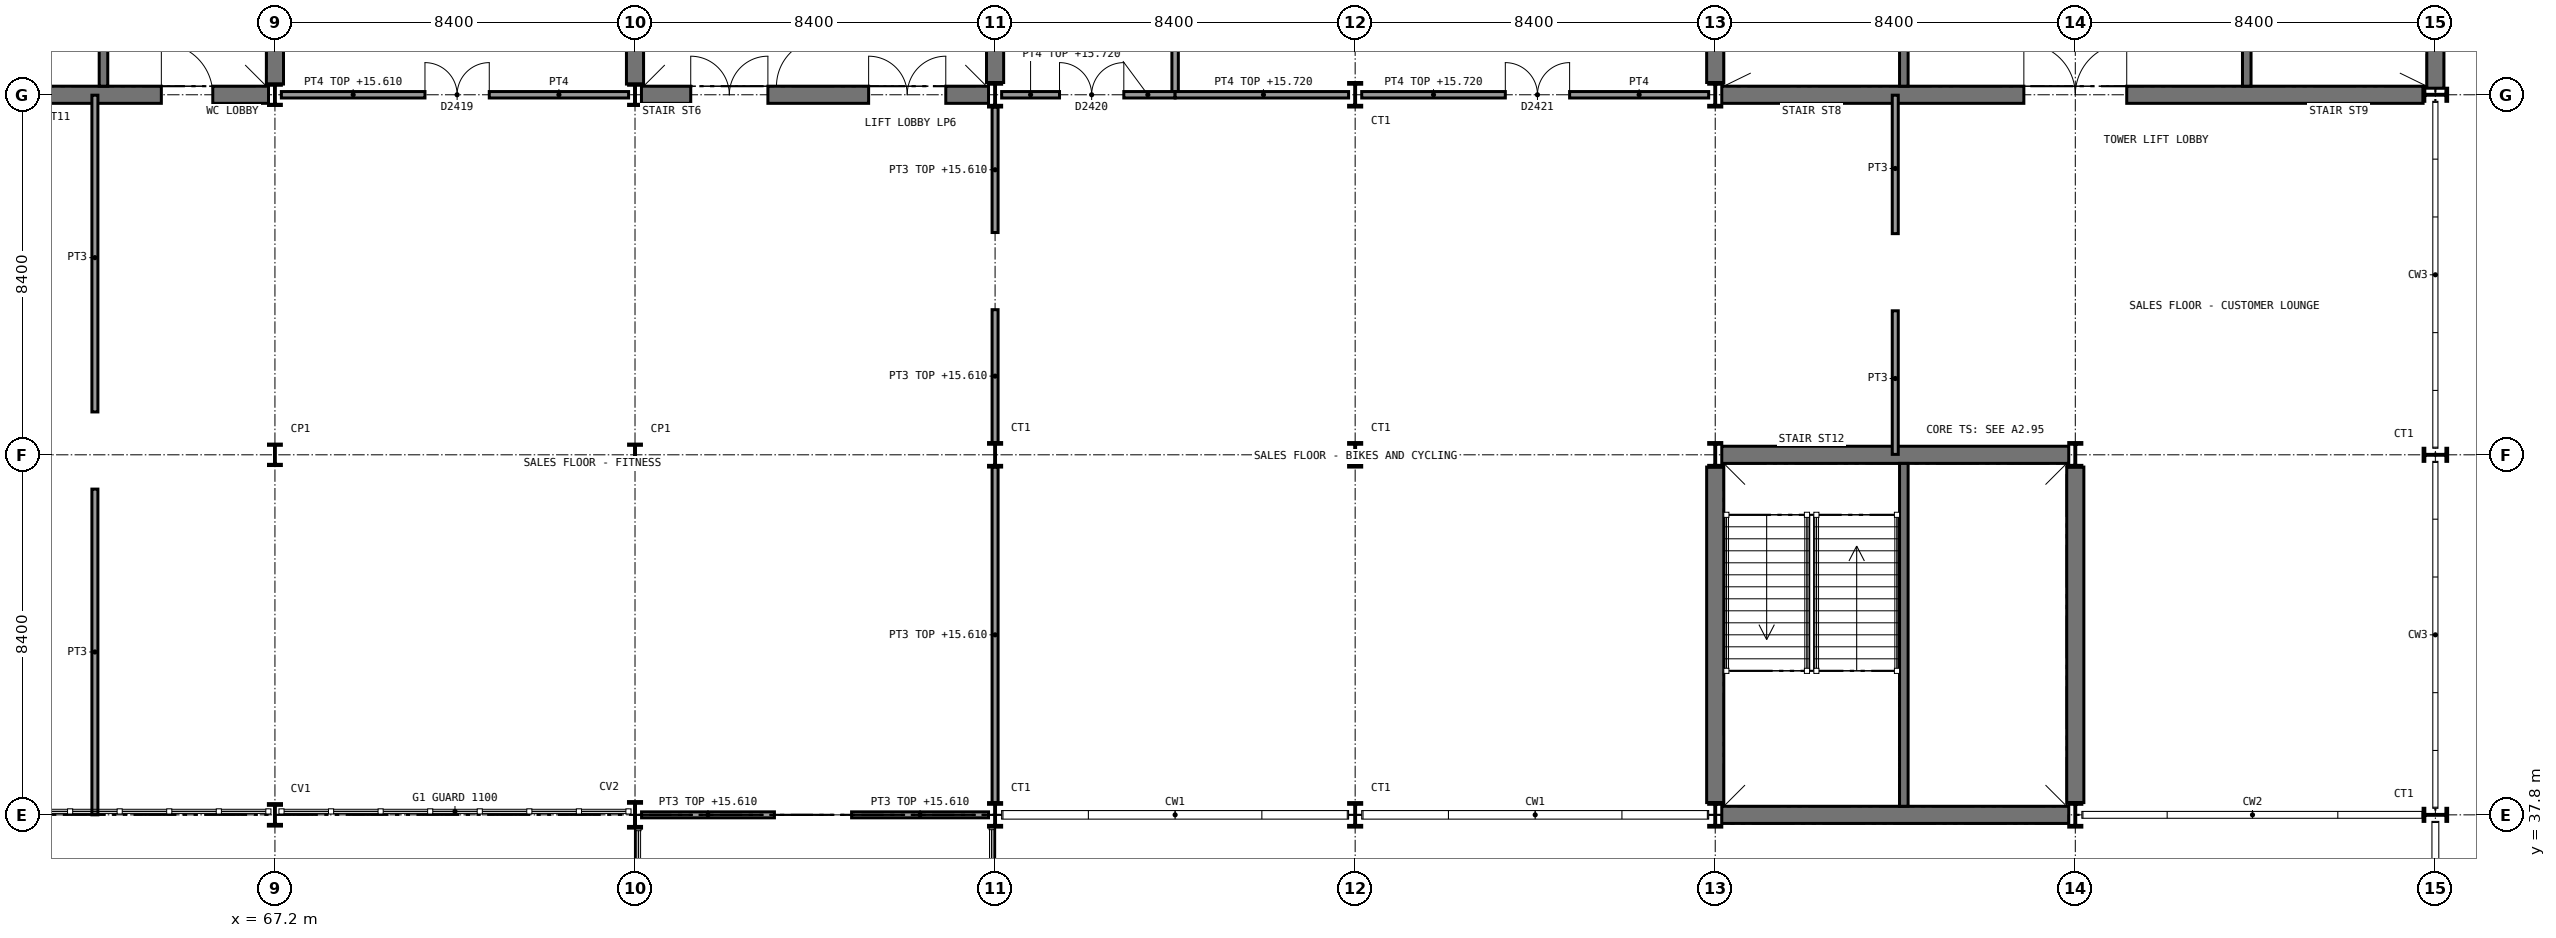
"""IFC4 building model, lengths in metres.
Left out: names, types, materials, properties, quantities, classifications, styles, units other than length and angle.
Written with IfcOpenShell. Run it as: python <this file> out.ifc"""

import sys

from ifc_helpers import new_model, si_unit, direction, frame, frame_2d, origin, origin_2d, place, context, subcontext, project, spatial, rectangle, i_section, extrude, element, fill, save


model = new_model("IFC4")
c1 = context("Model", 3, precision=1e-05, world=origin(), true_north=direction((0.0, 1.0)))
c2 = subcontext(c1, "Body", "Model", "MODEL_VIEW")
j1 = project(units=[si_unit("LENGTHUNIT", "METRE"), si_unit("PLANEANGLEUNIT", "RADIAN")], contexts=[c1])
p1 = place(None, origin())
s1 = spatial("IfcSite", under=j1, at=p1, CompositionType="ELEMENT")
p2 = place(p1, origin())
s2 = spatial("IfcBuilding", under=s1, at=p2, CompositionType="ELEMENT")
p3 = place(p2, frame((0.0, 0.0, 11.4)))
s3 = spatial("IfcBuildingStorey", under=s2, at=p3, CompositionType="ELEMENT", Elevation=11.4)
p4 = place(p3, frame((75.75, 54.6, 0.0), z_axis=(0.0, 0.0, 1.0), x_axis=(1.0, 0.0, 0.0)))
e1 = element("IfcWall", 1, at=p4, inside=s3, PredefinedType="SHEAR", context=c2, shape_type="SweptSolid", body=[
    extrude(rectangle(XDim=8.097, YDim=0.4, at=frame_2d((4.048, 0.0))), origin(), (0.0, 0.0, 1.0), 4.65),
])
p5 = place(p4, frame((1.15, 0.0, 0.0)))
e2 = element("IfcOpeningElement", 2, at=p5, cuts=e1, PredefinedType="OPENING", context=c2, shape_type="SweptSolid", body=[
    extrude(rectangle(XDim=1.8, YDim=2.1, at=frame_2d((0.9, 1.05))), frame((0.0, 0.21, 0.0), z_axis=(0.0, -1.0, 0.0), x_axis=(1.0, 0.0, 0.0)), (0.0, 0.0, 1.0), 0.42),
])
p6 = place(p4, frame((5.3, 0.0, 0.0)))
e3 = element("IfcOpeningElement", 3, at=p6, cuts=e1, PredefinedType="OPENING", context=c2, shape_type="SweptSolid", body=[
    extrude(rectangle(XDim=1.8, YDim=2.1, at=frame_2d((0.9, 1.05))), frame((0.0, 0.21, 0.0), z_axis=(0.0, -1.0, 0.0), x_axis=(1.0, 0.0, 0.0)), (0.0, 0.0, 1.0), 0.42),
])
p7 = place(p3, frame((75.6, 54.85, 0.0), z_axis=(0.0, 0.0, 1.0), x_axis=(0.0, 1.0, 0.0)))
e4 = element("IfcWall", 4, at=p7, inside=s3, PredefinedType="SHEAR", context=c2, shape_type="SweptSolid", body=[
    extrude(rectangle(XDim=7.9, YDim=0.4, at=frame_2d((3.95, 0.0))), origin(), (0.0, 0.0, 1.0), 4.65),
])
p8 = place(p3, frame((84.0, 54.886, 0.0), z_axis=(0.0, 0.0, 1.0), x_axis=(0.0, 1.0, 0.0)))
e5 = element("IfcWall", 5, at=p8, inside=s3, PredefinedType="SHEAR", context=c2, shape_type="SweptSolid", body=[
    extrude(rectangle(XDim=7.828, YDim=0.4, at=frame_2d((3.914, 0.0))), origin(), (0.0, 0.0, 1.0), 4.65),
])
p9 = place(p3, frame((58.95, 54.6, 0.0), z_axis=(0.0, 0.0, 1.0), x_axis=(1.0, 0.0, 0.0)))
e6 = element("IfcWall", 6, at=p9, inside=s3, PredefinedType="SHEAR", context=c2, shape_type="SweptSolid", body=[
    extrude(rectangle(XDim=8.1, YDim=0.4, at=frame_2d((4.05, 0.0))), origin(), (0.0, 0.0, 1.0), 4.65),
])
p10 = place(p9, frame((1.15, 0.0, 0.0)))
e7 = element("IfcOpeningElement", 7, at=p10, cuts=e6, PredefinedType="OPENING", context=c2, shape_type="SweptSolid", body=[
    extrude(rectangle(XDim=1.8, YDim=2.1, at=frame_2d((0.9, 1.05))), frame((0.0, 0.21, 0.0), z_axis=(0.0, -1.0, 0.0), x_axis=(1.0, 0.0, 0.0)), (0.0, 0.0, 1.0), 0.42),
])
p11 = place(p9, frame((5.6, 0.0, 0.0)))
e8 = element("IfcOpeningElement", 8, at=p11, cuts=e6, PredefinedType="OPENING", context=c2, shape_type="SweptSolid", body=[
    extrude(rectangle(XDim=1.2, YDim=2.1, at=frame_2d((0.6, 1.05))), frame((0.0, 0.21, 0.0), z_axis=(0.0, -1.0, 0.0), x_axis=(1.0, 0.0, 0.0)), (0.0, 0.0, 1.0), 0.42),
])
p12 = place(p3, frame((67.2, 54.85, 0.0), z_axis=(0.0, 0.0, 1.0), x_axis=(0.0, 1.0, 0.0)))
e9 = element("IfcWall", 9, at=p12, inside=s3, PredefinedType="SHEAR", context=c2, shape_type="SweptSolid", body=[
    extrude(rectangle(XDim=7.9, YDim=0.4, at=frame_2d((3.95, 0.0))), origin(), (0.0, 0.0, 1.0), 4.65),
])
p13 = place(p3, frame((100.953, 54.6, 0.0), z_axis=(0.0, 0.0, 1.0), x_axis=(1.0, 0.0, 0.0)))
e10 = element("IfcWall", 10, at=p13, inside=s3, PredefinedType="SHEAR", context=c2, shape_type="SweptSolid", body=[
    extrude(rectangle(XDim=16.361, YDim=0.4, at=frame_2d((8.181, 0.0))), origin(), (0.0, 0.0, 1.0), 4.65),
])
p14 = place(p13, frame((7.047, 0.0, 0.0)))
e11 = element("IfcOpeningElement", 11, at=p14, cuts=e10, PredefinedType="OPENING", context=c2, shape_type="SweptSolid", body=[
    extrude(rectangle(XDim=2.4, YDim=2.4, at=frame_2d((1.2, 1.2))), frame((0.0, 0.21, 0.0), z_axis=(0.0, -1.0, 0.0), x_axis=(1.0, 0.0, 0.0)), (0.0, 0.0, 1.0), 0.42),
])
p15 = place(p3, frame((100.8, 54.886, 0.0), z_axis=(0.0, 0.0, 1.0), x_axis=(0.0, 1.0, 0.0)))
e12 = element("IfcWall", 12, at=p15, inside=s3, PredefinedType="SHEAR", context=c2, shape_type="SweptSolid", body=[
    extrude(rectangle(XDim=7.828, YDim=0.4, at=frame_2d((3.914, 0.0))), origin(), (0.0, 0.0, 1.0), 4.65),
])
for number, where, z_axis, x_axis in (
    (13, (117.6, 54.753, 0.0), (0.0, 0.0, 1.0), (0.0, 1.0, 0.0)),
    (14, (100.953, 37.8, 0.0), (0.0, 0.0, 1.0), (1.0, 0.0, 0.0)),
    (15, (100.953, 46.2, 0.0), (0.0, 0.0, 1.0), (1.0, 0.0, 0.0)),
):
    element("IfcWall", number, at=place(p3, frame(where, z_axis=z_axis, x_axis=x_axis)), inside=s3, PredefinedType="SHEAR", context=c2, shape_type="SweptSolid", body=[
        extrude(rectangle(XDim=8.094, YDim=0.4, at=frame_2d((4.047, 0.0))), origin(), (0.0, 0.0, 1.0), 4.65),
    ])
for number, where, z_axis, x_axis in (
    (16, (100.8, 38.086, 0.0), (0.0, 0.0, 1.0), (0.0, 1.0, 0.0)),
    (17, (109.2, 38.086, 0.0), (0.0, 0.0, 1.0), (0.0, 1.0, 0.0)),
):
    element("IfcWall", number, at=place(p3, frame(where, z_axis=z_axis, x_axis=x_axis)), inside=s3, PredefinedType="SHEAR", context=c2, shape_type="SweptSolid", body=[
        extrude(rectangle(XDim=7.828, YDim=0.4, at=frame_2d((3.914, 0.0))), origin(), (0.0, 0.0, 1.0), 4.65),
    ])
p16 = place(p3, frame((67.2, 37.8, 0.0), z_axis=(0.0, 0.0, 1.0), x_axis=(1.0, 0.0, 0.0)))
e18 = element("IfcColumn", 18, at=p16, inside=s3, PredefinedType="COLUMN", context=c2, shape_type="SweptSolid", body=[
    extrude(i_section(OverallWidth=0.306, OverallDepth=0.524, WebThickness=0.021, FlangeThickness=0.04, FilletRadius=0.027, at=origin_2d()), origin(), (0.0, 0.0, 1.0), 4.8),
])
for number, where, z_axis, x_axis in (
    (19, (67.2, 46.2, 0.0), (0.0, 0.0, 1.0), (1.0, 0.0, 0.0)),
    (20, (67.2, 54.6, 0.0), (0.0, 0.0, 1.0), (1.0, 0.0, 0.0)),
):
    element("IfcColumn", number, at=place(p3, frame(where, z_axis=z_axis, x_axis=x_axis)), inside=s3, PredefinedType="COLUMN", context=c2, shape_type="SweptSolid", body=[
        extrude(i_section(OverallWidth=0.3, OverallDepth=0.5, WebThickness=0.014, FlangeThickness=0.028, FilletRadius=0.027, at=origin_2d()), origin(), (0.0, 0.0, 1.0), 4.8),
    ])
p17 = place(p3, frame((75.6, 37.8, 0.0), z_axis=(0.0, 0.0, 1.0), x_axis=(1.0, 0.0, 0.0)))
e21 = element("IfcColumn", 21, at=p17, inside=s3, PredefinedType="COLUMN", context=c2, shape_type="SweptSolid", body=[
    extrude(i_section(OverallWidth=0.305, OverallDepth=0.62, WebThickness=0.021, FlangeThickness=0.04, FilletRadius=0.027, at=origin_2d()), origin(), (0.0, 0.0, 1.0), 4.8),
])
for number, where, z_axis, x_axis in (
    (22, (75.6, 46.2, 0.0), (0.0, 0.0, 1.0), (1.0, 0.0, 0.0)),
    (23, (75.6, 54.6, 0.0), (0.0, 0.0, 1.0), (1.0, 0.0, 0.0)),
):
    element("IfcColumn", number, at=place(p3, frame(where, z_axis=z_axis, x_axis=x_axis)), inside=s3, PredefinedType="COLUMN", context=c2, shape_type="SweptSolid", body=[
        extrude(i_section(OverallWidth=0.3, OverallDepth=0.5, WebThickness=0.014, FlangeThickness=0.028, FilletRadius=0.027, at=origin_2d()), origin(), (0.0, 0.0, 1.0), 4.8),
    ])
for number, where, z_axis, x_axis in (
    (24, (84.0, 37.8, 0.0), (0.0, 0.0, 1.0), (1.0, 0.0, 0.0)),
    (25, (84.0, 46.2, 0.0), (0.0, 0.0, 1.0), (1.0, 0.0, 0.0)),
    (26, (84.0, 54.6, 0.0), (0.0, 0.0, 1.0), (1.0, 0.0, 0.0)),
    (27, (92.4, 37.8, 0.0), (0.0, 0.0, 1.0), (1.0, 0.0, 0.0)),
    (28, (92.4, 46.2, 0.0), (0.0, 0.0, 1.0), (1.0, 0.0, 0.0)),
    (29, (92.4, 54.6, 0.0), (0.0, 0.0, 1.0), (1.0, 0.0, 0.0)),
    (30, (100.8, 37.8, 0.0), (0.0, 0.0, 1.0), (1.0, 0.0, 0.0)),
    (31, (100.8, 46.2, 0.0), (0.0, 0.0, 1.0), (1.0, 0.0, 0.0)),
    (32, (100.8, 54.6, 0.0), (0.0, 0.0, 1.0), (1.0, 0.0, 0.0)),
    (33, (109.2, 37.8, 0.0), (0.0, 0.0, 1.0), (1.0, 0.0, 0.0)),
    (34, (109.2, 46.2, 0.0), (0.0, 0.0, 1.0), (1.0, 0.0, 0.0)),
    (35, (117.6, 37.8, 0.0), (0.0, 0.0, 1.0), (0.0, 1.0, 0.0)),
    (36, (117.6, 46.2, 0.0), (0.0, 0.0, 1.0), (0.0, 1.0, 0.0)),
    (37, (117.6, 54.6, 0.0), (0.0, 0.0, 1.0), (0.0, 1.0, 0.0)),
):
    element("IfcColumn", number, at=place(p3, frame(where, z_axis=z_axis, x_axis=x_axis)), inside=s3, PredefinedType="COLUMN", context=c2, shape_type="SweptSolid", body=[
        extrude(i_section(OverallWidth=0.306, OverallDepth=0.572, WebThickness=0.021, FlangeThickness=0.04, FilletRadius=0.027, at=origin_2d()), origin(), (0.0, 0.0, 1.0), 4.8),
    ])
p18 = place(p3, frame((67.35, 54.6, 0.0), z_axis=(0.0, 0.0, 1.0), x_axis=(1.0, 0.0, 0.0)))
e38 = element("IfcWall", 38, at=p18, inside=s3, PredefinedType="SOLIDWALL", context=c2, shape_type="SweptSolid", body=[
    extrude(rectangle(XDim=8.1, YDim=0.15, at=frame_2d((4.05, 0.0))), origin(), (0.0, 0.0, 1.0), 4.21),
])
p19 = place(p18, frame((3.35, 0.0, 0.0)))
e39 = element("IfcOpeningElement", 39, at=p19, cuts=e38, PredefinedType="OPENING", context=c2, shape_type="SweptSolid", body=[
    extrude(rectangle(XDim=1.5, YDim=2.1, at=frame_2d((0.75, 1.05))), frame((0.0, 0.085, 0.0), z_axis=(0.0, -1.0, 0.0), x_axis=(1.0, 0.0, 0.0)), (0.0, 0.0, 1.0), 0.17),
])
p20 = place(p3, frame((88.2, 54.6, 0.0), z_axis=(0.0, 0.0, 1.0), x_axis=(0.0, 1.0, 0.0)))
e40 = element("IfcWall", 40, at=p20, inside=s3, PredefinedType="SOLIDWALL", context=c2, shape_type="SweptSolid", body=[
    extrude(rectangle(XDim=8.4, YDim=0.15, at=frame_2d((4.2, 0.0))), origin(), (0.0, 0.0, 1.0), 4.65),
])
p21 = place(p3, frame((84.153, 54.6, 0.0), z_axis=(0.0, 0.0, 1.0), x_axis=(1.0, 0.0, 0.0)))
e41 = element("IfcWall", 41, at=p21, inside=s3, PredefinedType="SOLIDWALL", context=c2, shape_type="SweptSolid", body=[
    extrude(rectangle(XDim=4.047, YDim=0.15, at=frame_2d((2.023, 0.0))), origin(), (0.0, 0.0, 1.0), 4.32),
])
p22 = place(p21, frame((1.35, 0.0, 0.0)))
e42 = element("IfcOpeningElement", 42, at=p22, cuts=e41, PredefinedType="OPENING", context=c2, shape_type="SweptSolid", body=[
    extrude(rectangle(XDim=1.5, YDim=2.1, at=frame_2d((0.75, 1.05))), frame((0.0, 0.085, 0.0), z_axis=(0.0, -1.0, 0.0), x_axis=(1.0, 0.0, 0.0)), (0.0, 0.0, 1.0), 0.17),
])
p23 = place(p3, frame((88.2, 54.6, 0.0), z_axis=(0.0, 0.0, 1.0), x_axis=(1.0, 0.0, 0.0)))
e43 = element("IfcWall", 43, at=p23, inside=s3, PredefinedType="SOLIDWALL", context=c2, shape_type="SweptSolid", body=[
    extrude(rectangle(XDim=4.047, YDim=0.15, at=frame_2d((2.023, 0.0))), origin(), (0.0, 0.0, 1.0), 4.32),
])
p24 = place(p3, frame((92.553, 54.6, 0.0), z_axis=(0.0, 0.0, 1.0), x_axis=(1.0, 0.0, 0.0)))
e44 = element("IfcWall", 44, at=p24, inside=s3, PredefinedType="SOLIDWALL", context=c2, shape_type="SweptSolid", body=[
    extrude(rectangle(XDim=8.094, YDim=0.15, at=frame_2d((4.047, 0.0))), origin(), (0.0, 0.0, 1.0), 4.32),
])
p25 = place(p24, frame((3.35, 0.0, 0.0)))
e45 = element("IfcOpeningElement", 45, at=p25, cuts=e44, PredefinedType="OPENING", context=c2, shape_type="SweptSolid", body=[
    extrude(rectangle(XDim=1.5, YDim=2.1, at=frame_2d((0.75, 1.05))), frame((0.0, 0.085, 0.0), z_axis=(0.0, -1.0, 0.0), x_axis=(1.0, 0.0, 0.0)), (0.0, 0.0, 1.0), 0.17),
])
p26 = place(p3, frame((63.0, 37.8, 0.0), z_axis=(0.0, 0.0, 1.0), x_axis=(0.0, 1.0, 0.0)))
e46 = element("IfcWall", 46, at=p26, inside=s3, PredefinedType="PARTITIONING", context=c2, shape_type="SweptSolid", body=[
    extrude(rectangle(XDim=7.6, YDim=0.14, at=frame_2d((3.8, 0.0))), origin(), (0.0, 0.0, 1.0), 4.65),
])
p27 = place(p3, frame((63.0, 47.2, 0.0), z_axis=(0.0, 0.0, 1.0), x_axis=(0.0, 1.0, 0.0)))
e47 = element("IfcWall", 47, at=p27, inside=s3, PredefinedType="PARTITIONING", context=c2, shape_type="SweptSolid", body=[
    extrude(rectangle(XDim=7.39, YDim=0.14, at=frame_2d((3.695, 0.0))), origin(), (0.0, 0.0, 1.0), 4.65),
])
p28 = place(p3, frame((84.0, 38.086, 0.0), z_axis=(0.0, 0.0, 1.0), x_axis=(0.0, 1.0, 0.0)))
e48 = element("IfcWall", 48, at=p28, inside=s3, PredefinedType="PARTITIONING", context=c2, shape_type="SweptSolid", body=[
    extrude(rectangle(XDim=7.828, YDim=0.14, at=frame_2d((3.914, 0.0))), origin(), (0.0, 0.0, 1.0), 4.21),
])
p29 = place(p3, frame((84.0, 46.486, 0.0), z_axis=(0.0, 0.0, 1.0), x_axis=(0.0, 1.0, 0.0)))
e49 = element("IfcWall", 49, at=p29, inside=s3, PredefinedType="PARTITIONING", context=c2, shape_type="SweptSolid", body=[
    extrude(rectangle(XDim=3.1, YDim=0.14, at=frame_2d((1.55, 0.0))), origin(), (0.0, 0.0, 1.0), 4.21),
])
p30 = place(p3, frame((84.0, 51.386, 0.0), z_axis=(0.0, 0.0, 1.0), x_axis=(0.0, 1.0, 0.0)))
e50 = element("IfcWall", 50, at=p30, inside=s3, PredefinedType="PARTITIONING", context=c2, shape_type="SweptSolid", body=[
    extrude(rectangle(XDim=2.928, YDim=0.14, at=frame_2d((1.464, 0.0))), origin(), (0.0, 0.0, 1.0), 4.21),
])
p31 = place(p3, frame((75.753, 37.8, 0.0), z_axis=(0.0, 0.0, 1.0), x_axis=(1.0, 0.0, 0.0)))
e51 = element("IfcWall", 51, at=p31, inside=s3, PredefinedType="PARTITIONING", context=c2, shape_type="SweptSolid", body=[
    extrude(rectangle(XDim=3.1, YDim=0.14, at=frame_2d((1.55, 0.0))), origin(), (0.0, 0.0, 1.0), 4.21),
])
p32 = place(p3, frame((80.653, 37.8, 0.0), z_axis=(0.0, 0.0, 1.0), x_axis=(1.0, 0.0, 0.0)))
e52 = element("IfcWall", 52, at=p32, inside=s3, PredefinedType="PARTITIONING", context=c2, shape_type="SweptSolid", body=[
    extrude(rectangle(XDim=3.194, YDim=0.14, at=frame_2d((1.597, 0.0))), origin(), (0.0, 0.0, 1.0), 4.21),
])
p33 = place(p3, frame((105.0, 46.21, 0.0), z_axis=(0.0, 0.0, 1.0), x_axis=(0.0, 1.0, 0.0)))
e53 = element("IfcWall", 53, at=p33, inside=s3, PredefinedType="PARTITIONING", context=c2, shape_type="SweptSolid", body=[
    extrude(rectangle(XDim=3.35, YDim=0.14, at=frame_2d((1.675, 0.0))), origin(), (0.0, 0.0, 1.0), 4.65),
])
p34 = place(p3, frame((105.0, 51.36, 0.0), z_axis=(0.0, 0.0, 1.0), x_axis=(0.0, 1.0, 0.0)))
e54 = element("IfcWall", 54, at=p34, inside=s3, PredefinedType="PARTITIONING", context=c2, shape_type="SweptSolid", body=[
    extrude(rectangle(XDim=3.23, YDim=0.14, at=frame_2d((1.615, 0.0))), origin(), (0.0, 0.0, 1.0), 4.65),
])
p35 = place(p3, frame((80.0, 62.8, 0.0), z_axis=(0.0, 0.0, 1.0), x_axis=(0.0, -1.0, 0.0)))
e55 = element("IfcWall", 55, at=p35, inside=s3, PredefinedType="SHEAR", context=c2, shape_type="SweptSolid", body=[
    extrude(rectangle(XDim=8.0, YDim=0.2, at=frame_2d((4.0, 0.0))), origin(), (0.0, 0.0, 1.0), 4.65),
])
p36 = place(p35, frame((6.9, 0.0, 0.0)))
e56 = element("IfcOpeningElement", 56, at=p36, cuts=e55, PredefinedType="OPENING", context=c2, shape_type="SweptSolid", body=[
    extrude(rectangle(XDim=1.11, YDim=2.1, at=frame_2d((0.555, 1.05))), frame((0.0, 0.11, 0.0), z_axis=(0.0, -1.0, 0.0), x_axis=(1.0, 0.0, 0.0)), (0.0, 0.0, 1.0), 0.22),
])
for number, where, z_axis, x_axis in (
    (57, (63.2, 62.8, 0.0), (0.0, 0.0, 1.0), (0.0, -1.0, 0.0)),
    (58, (105.2, 62.8, 0.0), (0.0, 0.0, 1.0), (0.0, -1.0, 0.0)),
    (59, (113.2, 62.8, 0.0), (0.0, 0.0, 1.0), (0.0, -1.0, 0.0)),
    (60, (105.2, 38.0, 0.0), (0.0, 0.0, 1.0), (0.0, 1.0, 0.0)),
):
    element("IfcWall", number, at=place(p3, frame(where, z_axis=z_axis, x_axis=x_axis)), inside=s3, PredefinedType="SHEAR", context=c2, shape_type="SweptSolid", body=[
        extrude(rectangle(XDim=8.0, YDim=0.2, at=frame_2d((4.0, 0.0))), origin(), (0.0, 0.0, 1.0), 4.65),
    ])
p37 = place(p19, origin())
e61 = element("IfcDoor", 61, at=p37, inside=s3, OperationType="DOUBLE_DOOR_SINGLE_SWING", PredefinedType="DOOR", context=c2, shape_type="SweptSolid", body=[
    extrude(rectangle(XDim=1.5, YDim=2.1, at=frame_2d((0.75, 1.05))), frame((0.0, 0.025, 0.0), z_axis=(0.0, -1.0, 0.0), x_axis=(1.0, 0.0, 0.0)), (0.0, 0.0, 1.0), 0.05),
])
fill(e39, e61)
p38 = place(p22, origin())
e62 = element("IfcDoor", 62, at=p38, inside=s3, OperationType="DOUBLE_DOOR_SINGLE_SWING", PredefinedType="DOOR", context=c2, shape_type="SweptSolid", body=[
    extrude(rectangle(XDim=1.5, YDim=2.1, at=frame_2d((0.75, 1.05))), frame((0.0, 0.025, 0.0), z_axis=(0.0, -1.0, 0.0), x_axis=(1.0, 0.0, 0.0)), (0.0, 0.0, 1.0), 0.05),
])
fill(e42, e62)
p39 = place(p25, origin())
e63 = element("IfcDoor", 63, at=p39, inside=s3, OperationType="DOUBLE_DOOR_SINGLE_SWING", PredefinedType="DOOR", context=c2, shape_type="SweptSolid", body=[
    extrude(rectangle(XDim=1.5, YDim=2.1, at=frame_2d((0.75, 1.05))), frame((0.0, 0.025, 0.0), z_axis=(0.0, -1.0, 0.0), x_axis=(1.0, 0.0, 0.0)), (0.0, 0.0, 1.0), 0.05),
])
fill(e45, e63)
p40 = place(p36, frame((1.1, 0.0, 0.0), z_axis=(0.0, 0.0, 1.0), x_axis=(-1.0, 0.0, 0.0)))
e64 = element("IfcDoor", 64, at=p40, inside=s3, OperationType="SINGLE_SWING_LEFT", PredefinedType="DOOR", context=c2, shape_type="SweptSolid", body=[
    extrude(rectangle(XDim=1.1, YDim=2.1, at=frame_2d((0.55, 1.05))), frame((0.0, 0.025, 0.0), z_axis=(0.0, -1.0, 0.0), x_axis=(1.0, 0.0, 0.0)), (0.0, 0.0, 1.0), 0.05),
])
fill(e56, e64)
p41 = place(p5, origin())
e65 = element("IfcDoor", 65, at=p41, inside=s3, OperationType="DOUBLE_DOOR_SINGLE_SWING", PredefinedType="DOOR", context=c2, shape_type="SweptSolid", body=[
    extrude(rectangle(XDim=1.8, YDim=2.1, at=frame_2d((0.9, 1.05))), frame((0.0, 0.025, 0.0), z_axis=(0.0, -1.0, 0.0), x_axis=(1.0, 0.0, 0.0)), (0.0, 0.0, 1.0), 0.05),
])
fill(e2, e65)
p42 = place(p6, origin())
e66 = element("IfcDoor", 66, at=p42, inside=s3, OperationType="DOUBLE_DOOR_SINGLE_SWING", PredefinedType="DOOR", context=c2, shape_type="SweptSolid", body=[
    extrude(rectangle(XDim=1.8, YDim=2.1, at=frame_2d((0.9, 1.05))), frame((0.0, 0.025, 0.0), z_axis=(0.0, -1.0, 0.0), x_axis=(1.0, 0.0, 0.0)), (0.0, 0.0, 1.0), 0.05),
])
fill(e3, e66)
p43 = place(p11, origin())
e67 = element("IfcDoor", 67, at=p43, inside=s3, OperationType="SINGLE_SWING_LEFT", PredefinedType="DOOR", context=c2, shape_type="SweptSolid", body=[
    extrude(rectangle(XDim=1.2, YDim=2.1, at=frame_2d((0.6, 1.05))), frame((0.0, 0.025, 0.0), z_axis=(0.0, -1.0, 0.0), x_axis=(1.0, 0.0, 0.0)), (0.0, 0.0, 1.0), 0.05),
])
fill(e8, e67)
p44 = place(p14, origin())
e68 = element("IfcDoor", 68, at=p44, inside=s3, OperationType="DOUBLE_DOOR_SINGLE_SWING", PredefinedType="DOOR", context=c2, shape_type="SweptSolid", body=[
    extrude(rectangle(XDim=2.4, YDim=2.4, at=frame_2d((1.2, 1.2))), frame((0.0, 0.025, 0.0), z_axis=(0.0, -1.0, 0.0), x_axis=(1.0, 0.0, 0.0)), (0.0, 0.0, 1.0), 0.05),
])
fill(e11, e68)
save(model, sys.argv[1])
